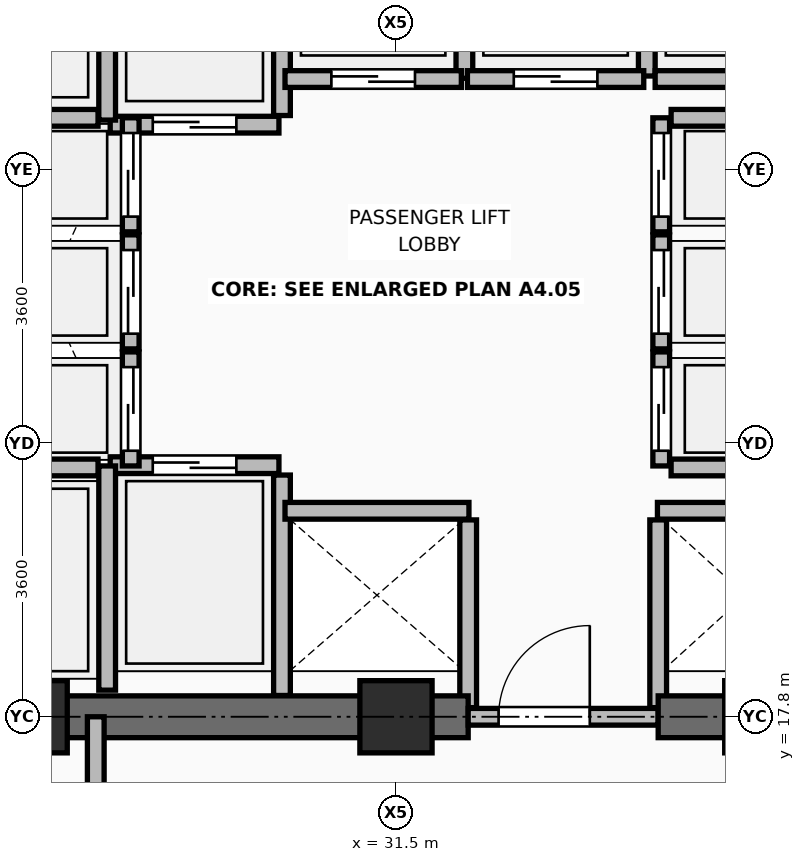
"""IFC4 building model, lengths in metres.
Left out: names, types, materials, properties, quantities, classifications, styles, units other than length and angle.
Written with IfcOpenShell. Run it as: python <this file> out.ifc"""

import sys

from ifc_helpers import new_model, si_unit, direction, frame, frame_2d, origin, origin_2d, place, context, subcontext, project, spatial, rectangle, extrude, element, fill, save


model = new_model("IFC4")
c1 = context("Model", 3, precision=1e-05, world=origin(), true_north=direction((0.0, 1.0)))
c2 = subcontext(c1, "Body", "Model", "MODEL_VIEW")
j1 = project(units=[si_unit("LENGTHUNIT", "METRE"), si_unit("PLANEANGLEUNIT", "RADIAN")], contexts=[c1])
p1 = place(None, origin())
s1 = spatial("IfcSite", under=j1, at=p1, CompositionType="ELEMENT")
p2 = place(p1, origin())
s2 = spatial("IfcBuilding", under=s1, at=p2, CompositionType="ELEMENT")
p3 = place(p2, frame((0.0, 0.0, 96.15)))
s3 = spatial("IfcBuildingStorey", under=s2, at=p3, CompositionType="ELEMENT", Elevation=96.15)
for number, where, z_axis, x_axis in (
    (1, (26.7, 17.8, 0.0), (0.0, 0.0, 1.0), (1.0, 0.0, 0.0)),
    (2, (31.5, 17.8, 0.0), (0.0, 0.0, 1.0), (1.0, 0.0, 0.0)),
    (3, (36.3, 17.8, 0.0), (0.0, 0.0, 1.0), (1.0, 0.0, 0.0)),
):
    element("IfcColumn", number, at=place(p3, frame(where, z_axis=z_axis, x_axis=x_axis)), inside=s3, PredefinedType="COLUMN", context=c2, shape_type="SweptSolid", body=[
        extrude(rectangle(XDim=0.95, YDim=0.95, at=origin_2d()), origin(), (0.0, 0.0, 1.0), 4.8),
    ])
p4 = place(p3, frame((30.0, 18.08, 0.0), z_axis=(0.0, 0.0, 1.0), x_axis=(0.0, 1.0, 0.0)))
e4 = element("IfcWall", 4, at=p4, inside=s3, PredefinedType="PARTITIONING", context=c2, shape_type="SweptSolid", body=[
    extrude(rectangle(XDim=2.9, YDim=0.22, at=frame_2d((1.45, 0.0))), origin(), (0.0, 0.0, 1.0), 4.595),
])
for number, where, z_axis, x_axis in (
    (5, (32.45, 17.92, 0.0), (0.0, 0.0, 1.0), (0.0, 1.0, 0.0)),
    (6, (34.95, 17.92, 0.0), (0.0, 0.0, 1.0), (0.0, 1.0, 0.0)),
):
    element("IfcWall", number, at=place(p3, frame(where, z_axis=z_axis, x_axis=x_axis)), inside=s3, PredefinedType="PARTITIONING", context=c2, shape_type="SweptSolid", body=[
        extrude(rectangle(XDim=2.47, YDim=0.22, at=frame_2d((1.235, 0.0))), origin(), (0.0, 0.0, 1.0), 4.056),
    ])
p5 = place(p3, frame((30.0, 25.71, 0.0), z_axis=(0.0, 0.0, 1.0), x_axis=(0.0, 1.0, 0.0)))
e7 = element("IfcWall", 7, at=p5, inside=s3, PredefinedType="PARTITIONING", context=c2, shape_type="SweptSolid", body=[
    extrude(rectangle(XDim=2.73, YDim=0.22, at=frame_2d((1.365, 0.0))), origin(), (0.0, 0.0, 1.0), 4.595),
])
p6 = place(p3, frame((32.4, 26.2, 0.0), z_axis=(0.0, 0.0, 1.0), x_axis=(0.0, 1.0, 0.0)))
e8 = element("IfcWall", 8, at=p6, inside=s3, PredefinedType="PARTITIONING", context=c2, shape_type="SweptSolid", body=[
    extrude(rectangle(XDim=2.24, YDim=0.22, at=frame_2d((1.12, 0.0))), origin(), (0.0, 0.0, 1.0), 4.595),
])
p7 = place(p3, frame((34.8, 26.23, 0.0), z_axis=(0.0, 0.0, 1.0), x_axis=(0.0, 1.0, 0.0)))
e9 = element("IfcWall", 9, at=p7, inside=s3, PredefinedType="PARTITIONING", context=c2, shape_type="SweptSolid", body=[
    extrude(rectangle(XDim=2.21, YDim=0.22, at=frame_2d((1.105, 0.0))), origin(), (0.0, 0.0, 1.0), 4.595),
])
p8 = place(p3, frame((34.91, 26.19, 0.0), z_axis=(0.0, 0.0, 1.0), x_axis=(1.0, 0.0, 0.0)))
e10 = element("IfcWall", 10, at=p8, inside=s3, PredefinedType="PARTITIONING", context=c2, shape_type="SweptSolid", body=[
    extrude(rectangle(XDim=2.14, YDim=0.22, at=frame_2d((1.07, 0.0))), origin(), (0.0, 0.0, 1.0), 4.595),
])
p9 = place(p3, frame((25.55, 17.8, 0.0), z_axis=(0.0, 0.0, 1.0), x_axis=(1.0, 0.0, 0.0)))
e11 = element("IfcWall", 11, at=p9, inside=s3, PredefinedType="SHEAR", context=c2, shape_type="SweptSolid", body=[
    extrude(rectangle(XDim=6.9, YDim=0.55, at=frame_2d((3.45, 0.0))), origin(), (0.0, 0.0, 1.0), 4.62),
])
p10 = place(p3, frame((32.45, 17.8, 0.0), z_axis=(0.0, 0.0, 1.0), x_axis=(1.0, 0.0, 0.0)))
e12 = element("IfcWall", 12, at=p10, inside=s3, PredefinedType="PARTITIONING", context=c2, shape_type="SweptSolid", body=[
    extrude(rectangle(XDim=2.5, YDim=0.22, at=frame_2d((1.25, 0.0))), origin(), (0.0, 0.0, 1.0), 4.056),
])
p11 = place(p10, frame((0.4, 0.0, 0.0)))
e13 = element("IfcOpeningElement", 13, at=p11, cuts=e12, PredefinedType="OPENING", context=c2, shape_type="SweptSolid", body=[
    extrude(rectangle(XDim=1.2, YDim=2.1, at=frame_2d((0.6, 1.05))), frame((0.0, 0.12, 0.0), z_axis=(0.0, -1.0, 0.0), x_axis=(1.0, 0.0, 0.0)), (0.0, 0.0, 1.0), 0.24),
])
p12 = place(p3, frame((34.95, 17.8, 0.0), z_axis=(0.0, 0.0, 1.0), x_axis=(1.0, 0.0, 0.0)))
e14 = element("IfcWall", 14, at=p12, inside=s3, PredefinedType="SHEAR", context=c2, shape_type="SweptSolid", body=[
    extrude(rectangle(XDim=6.425, YDim=0.55, at=frame_2d((3.212, 0.0))), origin(), (0.0, 0.0, 1.0), 4.62),
])
p13 = place(p3, frame((27.74, 21.11, 0.0), z_axis=(0.0, 0.0, 1.0), x_axis=(1.0, 0.0, 0.0)))
e15 = element("IfcWall", 15, at=p13, inside=s3, PredefinedType="PARTITIONING", context=c2, shape_type="SweptSolid", body=[
    extrude(rectangle(XDim=2.22, YDim=0.22, at=frame_2d((1.11, 0.0))), origin(), (0.0, 0.0, 1.0), 4.6),
])
p14 = place(p13, frame((0.56, 0.0, 0.0)))
e16 = element("IfcOpeningElement", 16, at=p14, cuts=e15, PredefinedType="OPENING", context=c2, shape_type="SweptSolid", body=[
    extrude(rectangle(XDim=1.1, YDim=2.2, at=frame_2d((0.55, 1.1))), frame((0.0, 0.12, 0.0), z_axis=(0.0, -1.0, 0.0), x_axis=(1.0, 0.0, 0.0)), (0.0, 0.0, 1.0), 0.24),
])
p15 = place(p3, frame((27.74, 25.59, 0.0), z_axis=(0.0, 0.0, 1.0), x_axis=(1.0, 0.0, 0.0)))
e17 = element("IfcWall", 17, at=p15, inside=s3, PredefinedType="PARTITIONING", context=c2, shape_type="SweptSolid", body=[
    extrude(rectangle(XDim=2.22, YDim=0.22, at=frame_2d((1.11, 0.0))), origin(), (0.0, 0.0, 1.0), 4.6),
])
p16 = place(p15, frame((0.56, 0.0, 0.0)))
e18 = element("IfcOpeningElement", 18, at=p16, cuts=e17, PredefinedType="OPENING", context=c2, shape_type="SweptSolid", body=[
    extrude(rectangle(XDim=1.1, YDim=2.2, at=frame_2d((0.55, 1.1))), frame((0.0, 0.12, 0.0), z_axis=(0.0, -1.0, 0.0), x_axis=(1.0, 0.0, 0.0)), (0.0, 0.0, 1.0), 0.24),
])
p17 = place(p3, frame((30.04, 20.51, 0.0), z_axis=(0.0, 0.0, 1.0), x_axis=(1.0, 0.0, 0.0)))
e19 = element("IfcWall", 19, at=p17, inside=s3, PredefinedType="PARTITIONING", context=c2, shape_type="SweptSolid", body=[
    extrude(rectangle(XDim=2.42, YDim=0.22, at=frame_2d((1.21, 0.0))), origin(), (0.0, 0.0, 1.0), 4.6),
])
p18 = place(p3, frame((34.94, 20.51, 0.0), z_axis=(0.0, 0.0, 1.0), x_axis=(1.0, 0.0, 0.0)))
e20 = element("IfcWall", 20, at=p18, inside=s3, PredefinedType="PARTITIONING", context=c2, shape_type="SweptSolid", body=[
    extrude(rectangle(XDim=2.24, YDim=0.22, at=frame_2d((1.12, 0.0))), origin(), (0.0, 0.0, 1.0), 4.6),
])
p19 = place(p3, frame((30.04, 26.19, 0.0), z_axis=(0.0, 0.0, 1.0), x_axis=(1.0, 0.0, 0.0)))
e21 = element("IfcWall", 21, at=p19, inside=s3, PredefinedType="PARTITIONING", context=c2, shape_type="SweptSolid", body=[
    extrude(rectangle(XDim=2.32, YDim=0.22, at=frame_2d((1.16, 0.0))), origin(), (0.0, 0.0, 1.0), 4.6),
])
p20 = place(p19, frame((0.61, 0.0, 0.0)))
e22 = element("IfcOpeningElement", 22, at=p20, cuts=e21, PredefinedType="OPENING", context=c2, shape_type="SweptSolid", body=[
    extrude(rectangle(XDim=1.1, YDim=2.2, at=frame_2d((0.55, 1.1))), frame((0.0, 0.12, 0.0), z_axis=(0.0, -1.0, 0.0), x_axis=(1.0, 0.0, 0.0)), (0.0, 0.0, 1.0), 0.24),
])
p21 = place(p3, frame((32.44, 26.19, 0.0), z_axis=(0.0, 0.0, 1.0), x_axis=(1.0, 0.0, 0.0)))
e23 = element("IfcWall", 23, at=p21, inside=s3, PredefinedType="PARTITIONING", context=c2, shape_type="SweptSolid", body=[
    extrude(rectangle(XDim=2.32, YDim=0.22, at=frame_2d((1.16, 0.0))), origin(), (0.0, 0.0, 1.0), 4.6),
])
p22 = place(p21, frame((0.61, 0.0, 0.0)))
e24 = element("IfcOpeningElement", 24, at=p22, cuts=e23, PredefinedType="OPENING", context=c2, shape_type="SweptSolid", body=[
    extrude(rectangle(XDim=1.1, YDim=2.2, at=frame_2d((0.55, 1.1))), frame((0.0, 0.12, 0.0), z_axis=(0.0, -1.0, 0.0), x_axis=(1.0, 0.0, 0.0)), (0.0, 0.0, 1.0), 0.24),
])
p23 = place(p3, frame((28.01, 21.1, 0.0), z_axis=(0.0, 0.0, 1.0), x_axis=(0.0, 1.0, 0.0)))
e25 = element("IfcWall", 25, at=p23, inside=s3, PredefinedType="PARTITIONING", context=c2, shape_type="SweptSolid", body=[
    extrude(rectangle(XDim=1.5, YDim=0.22, at=frame_2d((0.75, 0.0))), origin(), (0.0, 0.0, 1.0), 4.6),
])
p24 = place(p23, frame((0.2, 0.0, 0.0)))
e26 = element("IfcOpeningElement", 26, at=p24, cuts=e25, PredefinedType="OPENING", context=c2, shape_type="SweptSolid", body=[
    extrude(rectangle(XDim=1.1, YDim=2.2, at=frame_2d((0.55, 1.1))), frame((0.0, 0.12, 0.0), z_axis=(0.0, -1.0, 0.0), x_axis=(1.0, 0.0, 0.0)), (0.0, 0.0, 1.0), 0.24),
])
p25 = place(p3, frame((28.01, 22.64, 0.0), z_axis=(0.0, 0.0, 1.0), x_axis=(0.0, 1.0, 0.0)))
e27 = element("IfcWall", 27, at=p25, inside=s3, PredefinedType="PARTITIONING", context=c2, shape_type="SweptSolid", body=[
    extrude(rectangle(XDim=1.5, YDim=0.22, at=frame_2d((0.75, 0.0))), origin(), (0.0, 0.0, 1.0), 4.6),
])
p26 = place(p25, frame((0.2, 0.0, 0.0)))
e28 = element("IfcOpeningElement", 28, at=p26, cuts=e27, PredefinedType="OPENING", context=c2, shape_type="SweptSolid", body=[
    extrude(rectangle(XDim=1.1, YDim=2.2, at=frame_2d((0.55, 1.1))), frame((0.0, 0.12, 0.0), z_axis=(0.0, -1.0, 0.0), x_axis=(1.0, 0.0, 0.0)), (0.0, 0.0, 1.0), 0.24),
])
p27 = place(p3, frame((28.01, 24.18, 0.0), z_axis=(0.0, 0.0, 1.0), x_axis=(0.0, 1.0, 0.0)))
e29 = element("IfcWall", 29, at=p27, inside=s3, PredefinedType="PARTITIONING", context=c2, shape_type="SweptSolid", body=[
    extrude(rectangle(XDim=1.5, YDim=0.22, at=frame_2d((0.75, 0.0))), origin(), (0.0, 0.0, 1.0), 4.6),
])
p28 = place(p27, frame((0.2, 0.0, 0.0)))
e30 = element("IfcOpeningElement", 30, at=p28, cuts=e29, PredefinedType="OPENING", context=c2, shape_type="SweptSolid", body=[
    extrude(rectangle(XDim=1.1, YDim=2.2, at=frame_2d((0.55, 1.1))), frame((0.0, 0.12, 0.0), z_axis=(0.0, -1.0, 0.0), x_axis=(1.0, 0.0, 0.0)), (0.0, 0.0, 1.0), 0.24),
])
p29 = place(p3, frame((34.99, 21.1, 0.0), z_axis=(0.0, 0.0, 1.0), x_axis=(0.0, 1.0, 0.0)))
e31 = element("IfcWall", 31, at=p29, inside=s3, PredefinedType="PARTITIONING", context=c2, shape_type="SweptSolid", body=[
    extrude(rectangle(XDim=1.5, YDim=0.22, at=frame_2d((0.75, 0.0))), origin(), (0.0, 0.0, 1.0), 4.6),
])
p30 = place(p29, frame((0.2, 0.0, 0.0)))
e32 = element("IfcOpeningElement", 32, at=p30, cuts=e31, PredefinedType="OPENING", context=c2, shape_type="SweptSolid", body=[
    extrude(rectangle(XDim=1.1, YDim=2.2, at=frame_2d((0.55, 1.1))), frame((0.0, 0.12, 0.0), z_axis=(0.0, -1.0, 0.0), x_axis=(1.0, 0.0, 0.0)), (0.0, 0.0, 1.0), 0.24),
])
p31 = place(p3, frame((34.99, 22.64, 0.0), z_axis=(0.0, 0.0, 1.0), x_axis=(0.0, 1.0, 0.0)))
e33 = element("IfcWall", 33, at=p31, inside=s3, PredefinedType="PARTITIONING", context=c2, shape_type="SweptSolid", body=[
    extrude(rectangle(XDim=1.5, YDim=0.22, at=frame_2d((0.75, 0.0))), origin(), (0.0, 0.0, 1.0), 4.6),
])
p32 = place(p31, frame((0.2, 0.0, 0.0)))
e34 = element("IfcOpeningElement", 34, at=p32, cuts=e33, PredefinedType="OPENING", context=c2, shape_type="SweptSolid", body=[
    extrude(rectangle(XDim=1.1, YDim=2.2, at=frame_2d((0.55, 1.1))), frame((0.0, 0.12, 0.0), z_axis=(0.0, -1.0, 0.0), x_axis=(1.0, 0.0, 0.0)), (0.0, 0.0, 1.0), 0.24),
])
p33 = place(p3, frame((34.99, 24.18, 0.0), z_axis=(0.0, 0.0, 1.0), x_axis=(0.0, 1.0, 0.0)))
e35 = element("IfcWall", 35, at=p33, inside=s3, PredefinedType="PARTITIONING", context=c2, shape_type="SweptSolid", body=[
    extrude(rectangle(XDim=1.5, YDim=0.22, at=frame_2d((0.75, 0.0))), origin(), (0.0, 0.0, 1.0), 4.6),
])
p34 = place(p33, frame((0.2, 0.0, 0.0)))
e36 = element("IfcOpeningElement", 36, at=p34, cuts=e35, PredefinedType="OPENING", context=c2, shape_type="SweptSolid", body=[
    extrude(rectangle(XDim=1.1, YDim=2.2, at=frame_2d((0.55, 1.1))), frame((0.0, 0.12, 0.0), z_axis=(0.0, -1.0, 0.0), x_axis=(1.0, 0.0, 0.0)), (0.0, 0.0, 1.0), 0.24),
])
p35 = place(p3, frame((27.7, 18.15, 0.0), z_axis=(0.0, 0.0, 1.0), x_axis=(0.0, 1.0, 0.0)))
e37 = element("IfcWall", 37, at=p35, inside=s3, PredefinedType="PARTITIONING", context=c2, shape_type="SweptSolid", body=[
    extrude(rectangle(XDim=2.95, YDim=0.22, at=frame_2d((1.475, 0.0))), origin(), (0.0, 0.0, 1.0), 4.6),
])
p36 = place(p3, frame((27.7, 25.65, 0.0), z_axis=(0.0, 0.0, 1.0), x_axis=(0.0, 1.0, 0.0)))
e38 = element("IfcWall", 38, at=p36, inside=s3, PredefinedType="PARTITIONING", context=c2, shape_type="SweptSolid", body=[
    extrude(rectangle(XDim=3.0, YDim=0.22, at=frame_2d((1.5, 0.0))), origin(), (0.0, 0.0, 1.0), 4.6),
])
for number, where, z_axis, x_axis in (
    (39, (25.88, 21.08, 0.0), (0.0, 0.0, 1.0), (1.0, 0.0, 0.0)),
    (40, (25.88, 25.68, 0.0), (0.0, 0.0, 1.0), (1.0, 0.0, 0.0)),
):
    element("IfcWall", number, at=place(p3, frame(where, z_axis=z_axis, x_axis=x_axis)), inside=s3, PredefinedType="PARTITIONING", context=c2, shape_type="SweptSolid", body=[
        extrude(rectangle(XDim=1.7, YDim=0.22, at=frame_2d((0.85, 0.0))), origin(), (0.0, 0.0, 1.0), 4.6),
    ])
for number, where, z_axis, x_axis in (
    (41, (35.12, 21.08, 0.0), (0.0, 0.0, 1.0), (1.0, 0.0, 0.0)),
    (42, (35.12, 25.68, 0.0), (0.0, 0.0, 1.0), (1.0, 0.0, 0.0)),
):
    element("IfcWall", number, at=place(p3, frame(where, z_axis=z_axis, x_axis=x_axis)), inside=s3, PredefinedType="PARTITIONING", context=c2, shape_type="SweptSolid", body=[
        extrude(rectangle(XDim=1.94, YDim=0.22, at=frame_2d((0.97, 0.0))), origin(), (0.0, 0.0, 1.0), 4.6),
    ])
p37 = place(p3, frame((27.55, 14.35, 0.0), z_axis=(0.0, 0.0, 1.0), x_axis=(0.0, 1.0, 0.0)))
e43 = element("IfcWall", 43, at=p37, inside=s3, PredefinedType="PARTITIONING", context=c2, shape_type="SweptSolid", body=[
    extrude(rectangle(XDim=3.45, YDim=0.22, at=frame_2d((1.725, 0.0))), origin(), (0.0, 0.0, 1.0), 4.056),
])
p38 = place(p37, frame((1.175, 0.0, 0.0)))
e44 = element("IfcOpeningElement", 44, at=p38, cuts=e43, PredefinedType="OPENING", context=c2, shape_type="SweptSolid", body=[
    extrude(rectangle(XDim=1.1, YDim=2.1, at=frame_2d((0.55, 1.05))), frame((0.0, 0.12, 0.0), z_axis=(0.0, -1.0, 0.0), x_axis=(1.0, 0.0, 0.0)), (0.0, 0.0, 1.0), 0.24),
])
p39 = place(p11, origin())
e45 = element("IfcDoor", 45, at=p39, inside=s3, OperationType="SINGLE_SWING_RIGHT", PredefinedType="DOOR", context=c2, shape_type="SweptSolid", body=[
    extrude(rectangle(XDim=1.2, YDim=2.1, at=frame_2d((0.6, 1.05))), frame((0.0, 0.025, 0.0), z_axis=(0.0, -1.0, 0.0), x_axis=(1.0, 0.0, 0.0)), (0.0, 0.0, 1.0), 0.05),
])
fill(e13, e45)
p40 = place(p14, origin())
e46 = element("IfcDoor", 46, at=p40, inside=s3, OperationType="DOUBLE_DOOR_SLIDING", PredefinedType="DOOR", context=c2, shape_type="SweptSolid", body=[
    extrude(rectangle(XDim=1.1, YDim=2.2, at=frame_2d((0.55, 1.1))), frame((0.0, 0.025, 0.0), z_axis=(0.0, -1.0, 0.0), x_axis=(1.0, 0.0, 0.0)), (0.0, 0.0, 1.0), 0.05),
])
fill(e16, e46)
p41 = place(p16, frame((1.1, 0.0, 0.0), z_axis=(0.0, 0.0, 1.0), x_axis=(-1.0, 0.0, 0.0)))
e47 = element("IfcDoor", 47, at=p41, inside=s3, OperationType="DOUBLE_DOOR_SLIDING", PredefinedType="DOOR", context=c2, shape_type="SweptSolid", body=[
    extrude(rectangle(XDim=1.1, YDim=2.2, at=frame_2d((0.55, 1.1))), frame((0.0, 0.025, 0.0), z_axis=(0.0, -1.0, 0.0), x_axis=(1.0, 0.0, 0.0)), (0.0, 0.0, 1.0), 0.05),
])
fill(e18, e47)
p42 = place(p20, frame((1.1, 0.0, 0.0), z_axis=(0.0, 0.0, 1.0), x_axis=(-1.0, 0.0, 0.0)))
e48 = element("IfcDoor", 48, at=p42, inside=s3, OperationType="DOUBLE_DOOR_SLIDING", PredefinedType="DOOR", context=c2, shape_type="SweptSolid", body=[
    extrude(rectangle(XDim=1.1, YDim=2.2, at=frame_2d((0.55, 1.1))), frame((0.0, 0.025, 0.0), z_axis=(0.0, -1.0, 0.0), x_axis=(1.0, 0.0, 0.0)), (0.0, 0.0, 1.0), 0.05),
])
fill(e22, e48)
p43 = place(p22, frame((1.1, 0.0, 0.0), z_axis=(0.0, 0.0, 1.0), x_axis=(-1.0, 0.0, 0.0)))
e49 = element("IfcDoor", 49, at=p43, inside=s3, OperationType="DOUBLE_DOOR_SLIDING", PredefinedType="DOOR", context=c2, shape_type="SweptSolid", body=[
    extrude(rectangle(XDim=1.1, YDim=2.2, at=frame_2d((0.55, 1.1))), frame((0.0, 0.025, 0.0), z_axis=(0.0, -1.0, 0.0), x_axis=(1.0, 0.0, 0.0)), (0.0, 0.0, 1.0), 0.05),
])
fill(e24, e49)
p44 = place(p24, frame((1.1, 0.0, 0.0), z_axis=(0.0, 0.0, 1.0), x_axis=(-1.0, 0.0, 0.0)))
e50 = element("IfcDoor", 50, at=p44, inside=s3, OperationType="DOUBLE_DOOR_SLIDING", PredefinedType="DOOR", context=c2, shape_type="SweptSolid", body=[
    extrude(rectangle(XDim=1.1, YDim=2.2, at=frame_2d((0.55, 1.1))), frame((0.0, 0.025, 0.0), z_axis=(0.0, -1.0, 0.0), x_axis=(1.0, 0.0, 0.0)), (0.0, 0.0, 1.0), 0.05),
])
fill(e26, e50)
p45 = place(p26, frame((1.1, 0.0, 0.0), z_axis=(0.0, 0.0, 1.0), x_axis=(-1.0, 0.0, 0.0)))
e51 = element("IfcDoor", 51, at=p45, inside=s3, OperationType="DOUBLE_DOOR_SLIDING", PredefinedType="DOOR", context=c2, shape_type="SweptSolid", body=[
    extrude(rectangle(XDim=1.1, YDim=2.2, at=frame_2d((0.55, 1.1))), frame((0.0, 0.025, 0.0), z_axis=(0.0, -1.0, 0.0), x_axis=(1.0, 0.0, 0.0)), (0.0, 0.0, 1.0), 0.05),
])
fill(e28, e51)
p46 = place(p28, frame((1.1, 0.0, 0.0), z_axis=(0.0, 0.0, 1.0), x_axis=(-1.0, 0.0, 0.0)))
e52 = element("IfcDoor", 52, at=p46, inside=s3, OperationType="DOUBLE_DOOR_SLIDING", PredefinedType="DOOR", context=c2, shape_type="SweptSolid", body=[
    extrude(rectangle(XDim=1.1, YDim=2.2, at=frame_2d((0.55, 1.1))), frame((0.0, 0.025, 0.0), z_axis=(0.0, -1.0, 0.0), x_axis=(1.0, 0.0, 0.0)), (0.0, 0.0, 1.0), 0.05),
])
fill(e30, e52)
p47 = place(p30, origin())
e53 = element("IfcDoor", 53, at=p47, inside=s3, OperationType="DOUBLE_DOOR_SLIDING", PredefinedType="DOOR", context=c2, shape_type="SweptSolid", body=[
    extrude(rectangle(XDim=1.1, YDim=2.2, at=frame_2d((0.55, 1.1))), frame((0.0, 0.025, 0.0), z_axis=(0.0, -1.0, 0.0), x_axis=(1.0, 0.0, 0.0)), (0.0, 0.0, 1.0), 0.05),
])
fill(e32, e53)
p48 = place(p32, origin())
e54 = element("IfcDoor", 54, at=p48, inside=s3, OperationType="DOUBLE_DOOR_SLIDING", PredefinedType="DOOR", context=c2, shape_type="SweptSolid", body=[
    extrude(rectangle(XDim=1.1, YDim=2.2, at=frame_2d((0.55, 1.1))), frame((0.0, 0.025, 0.0), z_axis=(0.0, -1.0, 0.0), x_axis=(1.0, 0.0, 0.0)), (0.0, 0.0, 1.0), 0.05),
])
fill(e34, e54)
p49 = place(p34, origin())
e55 = element("IfcDoor", 55, at=p49, inside=s3, OperationType="DOUBLE_DOOR_SLIDING", PredefinedType="DOOR", context=c2, shape_type="SweptSolid", body=[
    extrude(rectangle(XDim=1.1, YDim=2.2, at=frame_2d((0.55, 1.1))), frame((0.0, 0.025, 0.0), z_axis=(0.0, -1.0, 0.0), x_axis=(1.0, 0.0, 0.0)), (0.0, 0.0, 1.0), 0.05),
])
fill(e36, e55)
save(model, sys.argv[1])
